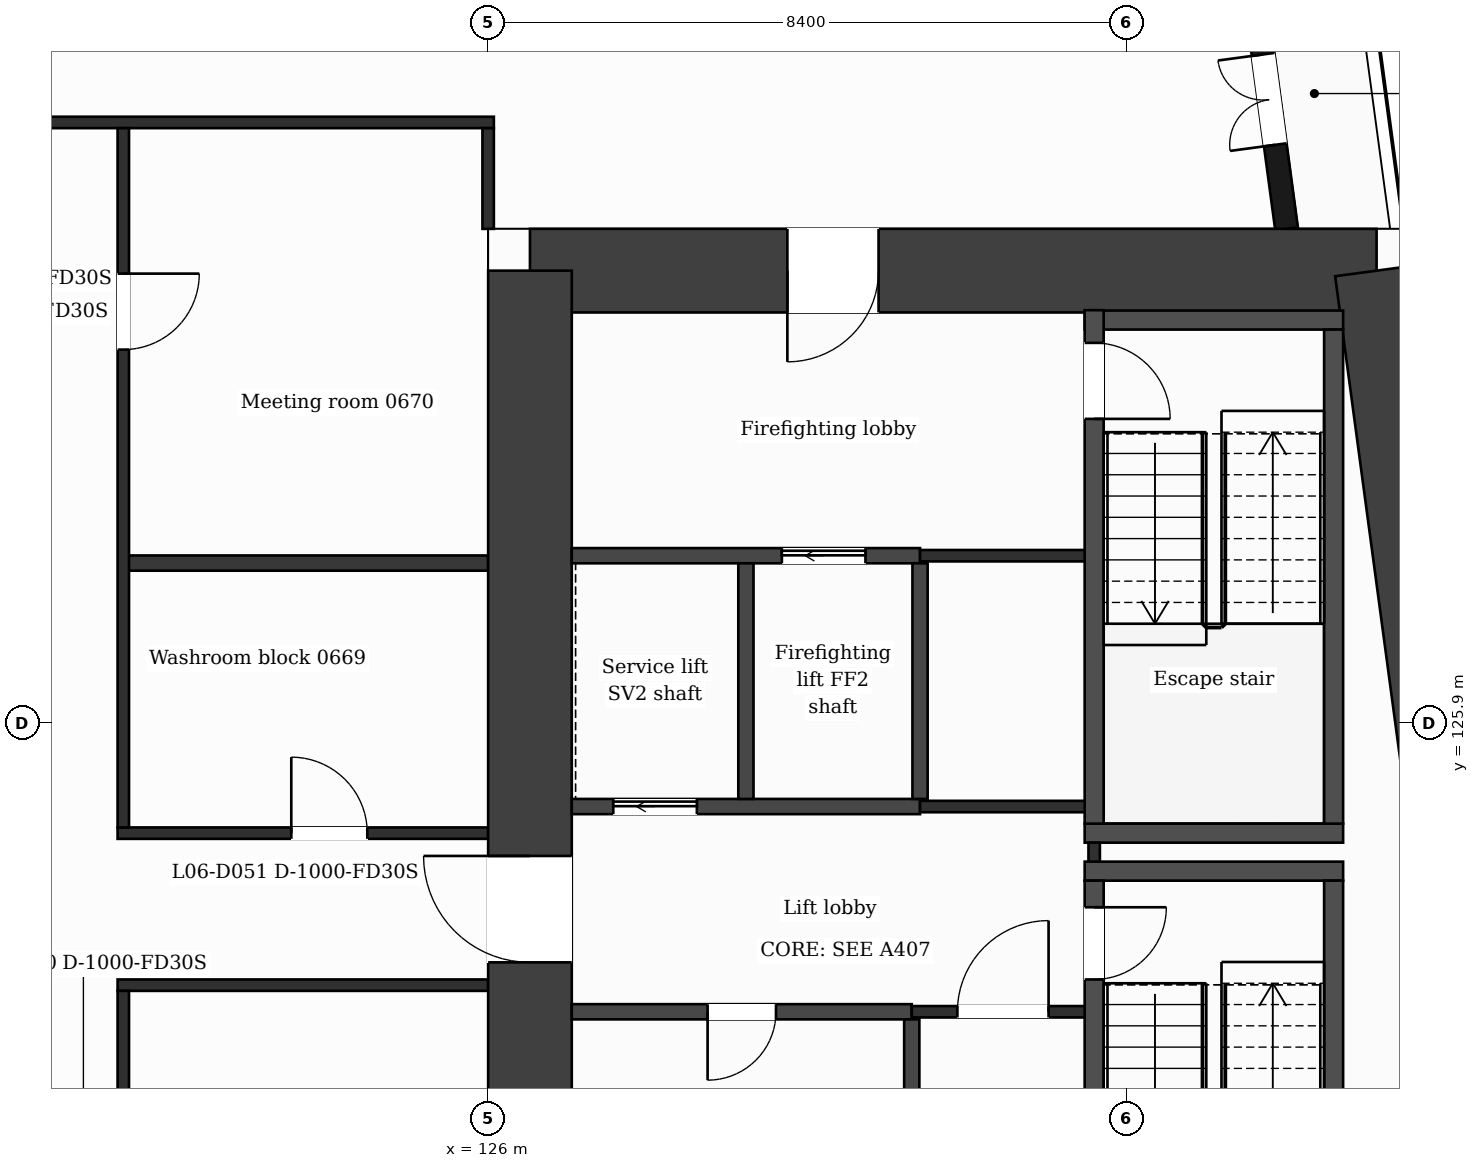
"""IFC4 building model, lengths in metres.
Left out: names, types, materials, properties, quantities, classifications, styles, units other than length and angle.
Written with IfcOpenShell. Run it as: python <this file> out.ifc"""

import sys

from ifc_helpers import new_model, si_unit, direction, frame, frame_2d, origin, place, context, subcontext, project, spatial, rectangle, extrude, element, fill, save


model = new_model("IFC4")
c1 = context("Model", 3, precision=1e-05, world=origin(), true_north=direction((0.0, 1.0)))
c2 = subcontext(c1, "Body", "Model", "MODEL_VIEW")
j1 = project(units=[si_unit("LENGTHUNIT", "METRE"), si_unit("PLANEANGLEUNIT", "RADIAN")], contexts=[c1])
p1 = place(None, origin())
s1 = spatial("IfcSite", under=j1, at=p1, CompositionType="ELEMENT")
p2 = place(p1, origin())
s2 = spatial("IfcBuilding", under=s1, at=p2, CompositionType="ELEMENT")
p3 = place(p2, frame((0.0, 0.0, 39.0)))
s3 = spatial("IfcBuildingStorey", under=s2, at=p3, CompositionType="ELEMENT", Elevation=39.0)
p4 = place(p3, frame((126.55, 131.85, 0.0), z_axis=(0.0, 0.0, 1.0), x_axis=(1.0, 0.0, 0.0)))
e1 = element("IfcWall", 1, at=p4, inside=s3, PredefinedType="SHEAR", context=c2, shape_type="SweptSolid", body=[
    extrude(rectangle(XDim=11.138, YDim=1.1, at=frame_2d((5.569, 0.0))), origin(), (0.0, 0.0, 1.0), 3.5),
])
p5 = place(p4, frame((3.386, 0.0, 0.0)))
e2 = element("IfcOpeningElement", 2, at=p5, cuts=e1, PredefinedType="OPENING", context=c2, shape_type="SweptSolid", body=[
    extrude(rectangle(XDim=1.2, YDim=2.1, at=frame_2d((0.6, 1.05))), frame((0.0, 0.56, 0.0), z_axis=(0.0, -1.0, 0.0), x_axis=(1.0, 0.0, 0.0)), (0.0, 0.0, 1.0), 1.12),
])
p6 = place(p3, frame((137.688, 131.85, 0.0), z_axis=(0.0, 0.0, 1.0), x_axis=(0.133411793472, -0.991060691059, 0.0)))
e3 = element("IfcWall", 3, at=p6, inside=s3, PredefinedType="SHEAR", context=c2, shape_type="SweptSolid", body=[
    extrude(rectangle(XDim=21.089, YDim=1.1, at=frame_2d((10.544, 0.0))), origin(), (0.0, 0.0, 1.0), 3.5),
])
p7 = place(p3, frame((126.55, 110.95, 0.0), z_axis=(0.0, 0.0, 1.0), x_axis=(0.0, 1.0, 0.0)))
e4 = element("IfcWall", 4, at=p7, inside=s3, PredefinedType="SHEAR", context=c2, shape_type="SweptSolid", body=[
    extrude(rectangle(XDim=20.9, YDim=1.1, at=frame_2d((10.45, 0.0))), origin(), (0.0, 0.0, 1.0), 3.5),
])
p8 = place(p7, frame((11.8, 0.0, 0.0)))
e5 = element("IfcOpeningElement", 5, at=p8, cuts=e4, PredefinedType="OPENING", context=c2, shape_type="SweptSolid", body=[
    extrude(rectangle(XDim=1.4, YDim=2.1, at=frame_2d((0.7, 1.05))), frame((0.0, 0.56, 0.0), z_axis=(0.0, -1.0, 0.0), x_axis=(1.0, 0.0, 0.0)), (0.0, 0.0, 1.0), 1.12),
])
p9 = place(p3, frame((136.504, 132.4, 0.0), z_axis=(0.0, 0.0, 1.0), x_axis=(-0.133399697462, 0.99106231929, 0.0)))
e6 = element("IfcWall", 6, at=p9, inside=s3, PredefinedType="SOLIDWALL", context=c2, shape_type="SweptSolid", body=[
    extrude(rectangle(XDim=6.74, YDim=0.3, at=frame_2d((3.37, 0.0))), origin(), (0.0, 0.0, 1.0), 3.18),
])
p10 = place(p9, frame((1.115, 0.0, 0.0)))
e7 = element("IfcOpeningElement", 7, at=p10, cuts=e6, PredefinedType="OPENING", context=c2, shape_type="SweptSolid", body=[
    extrude(rectangle(XDim=1.2, YDim=2.4, at=frame_2d((0.6, 1.2))), frame((0.0, 0.16, 0.0), z_axis=(0.0, -1.0, 0.0), x_axis=(1.0, 0.0, 0.0)), (0.0, 0.0, 1.0), 0.32),
])
p11 = place(p9, frame((3.835, 0.0, 0.9)))
e8 = element("IfcOpeningElement", 8, at=p11, cuts=e6, PredefinedType="OPENING", context=c2, shape_type="SweptSolid", body=[
    extrude(rectangle(XDim=2.4, YDim=2.1, at=frame_2d((1.2, 1.05))), frame((0.0, 0.16, 0.0), z_axis=(0.0, -1.0, 0.0), x_axis=(1.0, 0.0, 0.0)), (0.0, 0.0, 1.0), 0.32),
])
p12 = place(p3, frame((127.1, 122.1, 0.0), z_axis=(0.0, 0.0, 1.0), x_axis=(1.0, 0.0, 0.0)))
e9 = element("IfcWall", 9, at=p12, inside=s3, PredefinedType="PARTITIONING", context=c2, shape_type="SweptSolid", body=[
    extrude(rectangle(XDim=4.473, YDim=0.2, at=frame_2d((2.236, 0.0))), origin(), (0.0, 0.0, 1.0), 3.18),
])
p13 = place(p12, frame((1.787, 0.0, 0.0)))
e10 = element("IfcOpeningElement", 10, at=p13, cuts=e9, PredefinedType="OPENING", context=c2, shape_type="SweptSolid", body=[
    extrude(rectangle(XDim=0.9, YDim=2.1, at=frame_2d((0.45, 1.05))), frame((0.0, 0.11, 0.0), z_axis=(0.0, -1.0, 0.0), x_axis=(1.0, 0.0, 0.0)), (0.0, 0.0, 1.0), 0.22),
])
p14 = place(p3, frame((131.573, 122.1, 0.0), z_axis=(0.0, 0.0, 1.0), x_axis=(1.0, 0.0, 0.0)))
e11 = element("IfcWall", 11, at=p14, inside=s3, PredefinedType="PARTITIONING", context=c2, shape_type="SweptSolid", body=[
    extrude(rectangle(XDim=2.4, YDim=0.15, at=frame_2d((1.2, 0.0))), origin(), (0.0, 0.0, 1.0), 3.18),
])
p15 = place(p14, frame((0.6, 0.0, 0.0)))
e12 = element("IfcOpeningElement", 12, at=p15, cuts=e11, PredefinedType="OPENING", context=c2, shape_type="SweptSolid", body=[
    extrude(rectangle(XDim=1.2, YDim=2.1, at=frame_2d((0.6, 1.05))), frame((0.0, 0.085, 0.0), z_axis=(0.0, -1.0, 0.0), x_axis=(1.0, 0.0, 0.0)), (0.0, 0.0, 1.0), 0.17),
])
p16 = place(p3, frame((121.125, 122.45, 0.0), z_axis=(0.0, 0.0, 1.0), x_axis=(1.0, 0.0, 0.0)))
e13 = element("IfcWall", 13, at=p16, inside=s3, PredefinedType="PARTITIONING", context=c2, shape_type="SweptSolid", body=[
    extrude(rectangle(XDim=4.875, YDim=0.15, at=frame_2d((2.438, 0.0))), origin(), (0.0, 0.0, 1.0), 3.18),
])
for number, where, z_axis, x_axis in (
    (14, (133.848, 123.95, 0.0), (0.0, 0.0, 1.0), (1.0, 0.0, 0.0)),
    (15, (133.848, 124.45, 0.0), (0.0, 0.0, 1.0), (1.0, 0.0, 0.0)),
):
    element("IfcWall", number, at=place(p3, frame(where, z_axis=z_axis, x_axis=x_axis)), inside=s3, PredefinedType="PARTITIONING", context=c2, shape_type="SweptSolid", body=[
        extrude(rectangle(XDim=3.4, YDim=0.25, at=frame_2d((1.7, 0.0))), origin(), (0.0, 0.0, 1.0), 3.18),
    ])
p17 = place(p3, frame((121.125, 124.45, 0.0), z_axis=(0.0, 0.0, 1.0), x_axis=(1.0, 0.0, 0.0)))
e16 = element("IfcWall", 16, at=p17, inside=s3, PredefinedType="PARTITIONING", context=c2, shape_type="SweptSolid", body=[
    extrude(rectangle(XDim=4.875, YDim=0.15, at=frame_2d((2.438, 0.0))), origin(), (0.0, 0.0, 1.0), 3.18),
])
p18 = place(p17, frame((2.285, 0.0, 0.0)))
e17 = element("IfcOpeningElement", 17, at=p18, cuts=e16, PredefinedType="OPENING", context=c2, shape_type="SweptSolid", body=[
    extrude(rectangle(XDim=1.0, YDim=2.1, at=frame_2d((0.5, 1.05))), frame((0.0, 0.085, 0.0), z_axis=(0.0, -1.0, 0.0), x_axis=(1.0, 0.0, 0.0)), (0.0, 0.0, 1.0), 0.17),
])
p19 = place(p3, frame((127.1, 124.8, 0.0), z_axis=(0.0, 0.0, 1.0), x_axis=(1.0, 0.0, 0.0)))
e18 = element("IfcWall", 18, at=p19, inside=s3, PredefinedType="PARTITIONING", context=c2, shape_type="SweptSolid", body=[
    extrude(rectangle(XDim=4.582, YDim=0.2, at=frame_2d((2.291, 0.0))), origin(), (0.0, 0.0, 1.0), 3.18),
])
p20 = place(p19, frame((0.546, 0.0, 0.0)))
e19 = element("IfcOpeningElement", 19, at=p20, cuts=e18, PredefinedType="OPENING", context=c2, shape_type="SweptSolid", body=[
    extrude(rectangle(XDim=1.1, YDim=2.1, at=frame_2d((0.55, 1.05))), frame((0.0, 0.11, 0.0), z_axis=(0.0, -1.0, 0.0), x_axis=(1.0, 0.0, 0.0)), (0.0, 0.0, 1.0), 0.22),
])
p21 = place(p3, frame((131.682, 124.8, 0.0), z_axis=(0.0, 0.0, 1.0), x_axis=(1.0, 0.0, 0.0)))
e20 = element("IfcWall", 20, at=p21, inside=s3, PredefinedType="PARTITIONING", context=c2, shape_type="SweptSolid", body=[
    extrude(rectangle(XDim=2.416, YDim=0.15, at=frame_2d((1.208, 0.0))), origin(), (0.0, 0.0, 1.0), 3.18),
])
p22 = place(p3, frame((121.2, 128.003, 0.0), z_axis=(0.0, 0.0, 1.0), x_axis=(1.0, 0.0, 0.0)))
e21 = element("IfcWall", 21, at=p22, inside=s3, PredefinedType="PARTITIONING", context=c2, shape_type="SweptSolid", body=[
    extrude(rectangle(XDim=4.8, YDim=0.2, at=frame_2d((2.4, 0.0))), origin(), (0.0, 0.0, 1.0), 3.18),
])
p23 = place(p3, frame((127.1, 128.1, 0.0), z_axis=(0.0, 0.0, 1.0), x_axis=(1.0, 0.0, 0.0)))
e22 = element("IfcWall", 22, at=p23, inside=s3, PredefinedType="PARTITIONING", context=c2, shape_type="SweptSolid", body=[
    extrude(rectangle(XDim=4.582, YDim=0.2, at=frame_2d((2.291, 0.0))), origin(), (0.0, 0.0, 1.0), 3.18),
])
p24 = place(p23, frame((2.764, 0.0, 0.0)))
e23 = element("IfcOpeningElement", 23, at=p24, cuts=e22, PredefinedType="OPENING", context=c2, shape_type="SweptSolid", body=[
    extrude(rectangle(XDim=1.1, YDim=2.1, at=frame_2d((0.55, 1.05))), frame((0.0, 0.11, 0.0), z_axis=(0.0, -1.0, 0.0), x_axis=(1.0, 0.0, 0.0)), (0.0, 0.0, 1.0), 0.22),
])
p25 = place(p3, frame((131.682, 128.1, 0.0), z_axis=(0.0, 0.0, 1.0), x_axis=(1.0, 0.0, 0.0)))
e24 = element("IfcWall", 24, at=p25, inside=s3, PredefinedType="PARTITIONING", context=c2, shape_type="SweptSolid", body=[
    extrude(rectangle(XDim=2.291, YDim=0.15, at=frame_2d((1.146, 0.0))), origin(), (0.0, 0.0, 1.0), 3.18),
])
p26 = place(p3, frame((133.848, 131.2, 0.0), z_axis=(0.0, 0.0, 1.0), x_axis=(1.0, 0.0, 0.0)))
e25 = element("IfcWall", 25, at=p26, inside=s3, PredefinedType="PARTITIONING", context=c2, shape_type="SweptSolid", body=[
    extrude(rectangle(XDim=3.4, YDim=0.25, at=frame_2d((1.7, 0.0))), origin(), (0.0, 0.0, 1.0), 3.18),
])
p27 = place(p3, frame((100.725, 133.8, 0.0), z_axis=(0.0, 0.0, 1.0), x_axis=(1.0, 0.0, 0.0)))
e26 = element("IfcWall", 26, at=p27, inside=s3, PredefinedType="PARTITIONING", context=c2, shape_type="SweptSolid", body=[
    extrude(rectangle(XDim=25.35, YDim=0.15, at=frame_2d((12.675, 0.0))), origin(), (0.0, 0.0, 1.0), 3.18),
])
p28 = place(p3, frame((121.2, 109.075, 0.0), z_axis=(0.0, 0.0, 1.0), x_axis=(0.0, 1.0, 0.0)))
e27 = element("IfcWall", 27, at=p28, inside=s3, PredefinedType="PARTITIONING", context=c2, shape_type="SweptSolid", body=[
    extrude(rectangle(XDim=13.3, YDim=0.15, at=frame_2d((6.65, 0.0))), origin(), (0.0, 0.0, 1.0), 3.18),
])
p29 = place(p28, frame((9.154, 0.0, 0.0)))
e28 = element("IfcOpeningElement", 28, at=p29, cuts=e27, PredefinedType="OPENING", context=c2, shape_type="SweptSolid", body=[
    extrude(rectangle(XDim=1.0, YDim=2.1, at=frame_2d((0.5, 1.05))), frame((0.0, 0.085, 0.0), z_axis=(0.0, -1.0, 0.0), x_axis=(1.0, 0.0, 0.0)), (0.0, 0.0, 1.0), 0.17),
])
p30 = place(p3, frame((121.2, 124.525, 0.0), z_axis=(0.0, 0.0, 1.0), x_axis=(0.0, 1.0, 0.0)))
e29 = element("IfcWall", 29, at=p30, inside=s3, PredefinedType="PARTITIONING", context=c2, shape_type="SweptSolid", body=[
    extrude(rectangle(XDim=9.2, YDim=0.15, at=frame_2d((4.6, 0.0))), origin(), (0.0, 0.0, 1.0), 3.18),
])
p31 = place(p30, frame((6.286, 0.0, 0.0)))
e30 = element("IfcOpeningElement", 30, at=p31, cuts=e29, PredefinedType="OPENING", context=c2, shape_type="SweptSolid", body=[
    extrude(rectangle(XDim=1.0, YDim=2.1, at=frame_2d((0.5, 1.05))), frame((0.0, 0.085, 0.0), z_axis=(0.0, -1.0, 0.0), x_axis=(1.0, 0.0, 0.0)), (0.0, 0.0, 1.0), 0.17),
])
p32 = place(p3, frame((126.0, 132.4, 0.0), z_axis=(0.0, 0.0, 1.0), x_axis=(0.0, 1.0, 0.0)))
e31 = element("IfcWall", 31, at=p32, inside=s3, PredefinedType="PARTITIONING", context=c2, shape_type="SweptSolid", body=[
    extrude(rectangle(XDim=1.325, YDim=0.15, at=frame_2d((0.663, 0.0))), origin(), (0.0, 0.0, 1.0), 3.18),
])
p33 = place(p3, frame((129.391, 124.9, 0.0), z_axis=(0.0, 0.0, 1.0), x_axis=(0.0, 1.0, 0.0)))
e32 = element("IfcWall", 32, at=p33, inside=s3, PredefinedType="PARTITIONING", context=c2, shape_type="SweptSolid", body=[
    extrude(rectangle(XDim=3.1, YDim=0.2, at=frame_2d((1.55, 0.0))), origin(), (0.0, 0.0, 1.0), 3.18),
])
p34 = place(p3, frame((131.573, 117.07, 0.0), z_axis=(0.0, 0.0, 1.0), x_axis=(0.0, 1.0, 0.0)))
e33 = element("IfcWall", 33, at=p34, inside=s3, PredefinedType="PARTITIONING", context=c2, shape_type="SweptSolid", body=[
    extrude(rectangle(XDim=4.93, YDim=0.2, at=frame_2d((2.465, 0.0))), origin(), (0.0, 0.0, 1.0), 3.18),
])
p35 = place(p34, frame((0.48, 0.0, 0.0)))
e34 = element("IfcOpeningElement", 34, at=p35, cuts=e33, PredefinedType="OPENING", context=c2, shape_type="SweptSolid", body=[
    extrude(rectangle(XDim=0.9, YDim=2.1, at=frame_2d((0.45, 1.05))), frame((0.0, 0.11, 0.0), z_axis=(0.0, -1.0, 0.0), x_axis=(1.0, 0.0, 0.0)), (0.0, 0.0, 1.0), 0.22),
])
p36 = place(p3, frame((131.682, 124.9, 0.0), z_axis=(0.0, 0.0, 1.0), x_axis=(0.0, 1.0, 0.0)))
e35 = element("IfcWall", 35, at=p36, inside=s3, PredefinedType="PARTITIONING", context=c2, shape_type="SweptSolid", body=[
    extrude(rectangle(XDim=3.1, YDim=0.2, at=frame_2d((1.55, 0.0))), origin(), (0.0, 0.0, 1.0), 3.18),
])
p37 = place(p3, frame((133.973, 124.075, 0.0), z_axis=(0.0, 0.0, 1.0), x_axis=(0.0, 1.0, 0.0)))
e36 = element("IfcWall", 36, at=p37, inside=s3, PredefinedType="PARTITIONING", context=c2, shape_type="SweptSolid", body=[
    extrude(rectangle(XDim=0.25, YDim=0.15, at=frame_2d((0.125, 0.0))), origin(), (0.0, 0.0, 1.0), 3.18),
])
p38 = place(p3, frame((133.973, 117.07, 0.0), z_axis=(0.0, 0.0, 1.0), x_axis=(0.0, 1.0, 0.0)))
e37 = element("IfcWall", 37, at=p38, inside=s3, PredefinedType="PARTITIONING", context=c2, shape_type="SweptSolid", body=[
    extrude(rectangle(XDim=6.755, YDim=0.25, at=frame_2d((3.377, 0.0))), origin(), (0.0, 0.0, 1.0), 3.18),
])
p39 = place(p38, frame((5.455, 0.0, 0.0)))
e38 = element("IfcOpeningElement", 38, at=p39, cuts=e37, PredefinedType="OPENING", context=c2, shape_type="SweptSolid", body=[
    extrude(rectangle(XDim=0.95, YDim=2.1, at=frame_2d((0.475, 1.05))), frame((0.0, 0.135, 0.0), z_axis=(0.0, -1.0, 0.0), x_axis=(1.0, 0.0, 0.0)), (0.0, 0.0, 1.0), 0.27),
])
p40 = place(p3, frame((133.973, 124.575, 0.0), z_axis=(0.0, 0.0, 1.0), x_axis=(0.0, 1.0, 0.0)))
e39 = element("IfcWall", 39, at=p40, inside=s3, PredefinedType="PARTITIONING", context=c2, shape_type="SweptSolid", body=[
    extrude(rectangle(XDim=6.755, YDim=0.25, at=frame_2d((3.377, 0.0))), origin(), (0.0, 0.0, 1.0), 3.18),
])
p41 = place(p40, frame((5.325, 0.0, 0.0)))
e40 = element("IfcOpeningElement", 40, at=p41, cuts=e39, PredefinedType="OPENING", context=c2, shape_type="SweptSolid", body=[
    extrude(rectangle(XDim=1.0, YDim=2.1, at=frame_2d((0.5, 1.05))), frame((0.0, 0.135, 0.0), z_axis=(0.0, -1.0, 0.0), x_axis=(1.0, 0.0, 0.0)), (0.0, 0.0, 1.0), 0.27),
])
p42 = place(p3, frame((137.123, 117.07, 0.0), z_axis=(0.0, 0.0, 1.0), x_axis=(0.0, 1.0, 0.0)))
e41 = element("IfcWall", 41, at=p42, inside=s3, PredefinedType="PARTITIONING", context=c2, shape_type="SweptSolid", body=[
    extrude(rectangle(XDim=6.755, YDim=0.25, at=frame_2d((3.377, 0.0))), origin(), (0.0, 0.0, 1.0), 3.18),
])
p43 = place(p3, frame((137.123, 124.575, 0.0), z_axis=(0.0, 0.0, 1.0), x_axis=(0.0, 1.0, 0.0)))
e42 = element("IfcWall", 42, at=p43, inside=s3, PredefinedType="PARTITIONING", context=c2, shape_type="SweptSolid", body=[
    extrude(rectangle(XDim=6.5, YDim=0.25, at=frame_2d((3.25, 0.0))), origin(), (0.0, 0.0, 1.0), 3.18),
])
p44 = place(p10, origin())
e43 = element("IfcDoor", 43, at=p44, inside=s3, OperationType="DOUBLE_DOOR_SINGLE_SWING", PredefinedType="DOOR", context=c2, shape_type="SweptSolid", body=[
    extrude(rectangle(XDim=1.2, YDim=2.4, at=frame_2d((0.6, 1.2))), frame((0.0, 0.025, 0.0), z_axis=(0.0, -1.0, 0.0), x_axis=(1.0, 0.0, 0.0)), (0.0, 0.0, 1.0), 0.05),
])
fill(e7, e43)
p45 = place(p15, origin())
e44 = element("IfcDoor", 44, at=p45, inside=s3, OperationType="SINGLE_SWING_RIGHT", PredefinedType="DOOR", context=c2, shape_type="SweptSolid", body=[
    extrude(rectangle(XDim=1.2, YDim=2.1, at=frame_2d((0.6, 1.05))), frame((0.0, 0.025, 0.0), z_axis=(0.0, -1.0, 0.0), x_axis=(1.0, 0.0, 0.0)), (0.0, 0.0, 1.0), 0.05),
])
fill(e12, e44)
p46 = place(p24, origin())
e45 = element("IfcDoor", 45, at=p46, inside=s3, OperationType="SLIDING_TO_LEFT", PredefinedType="DOOR", context=c2, shape_type="SweptSolid", body=[
    extrude(rectangle(XDim=1.1, YDim=2.1, at=frame_2d((0.55, 1.05))), frame((0.0, 0.025, 0.0), z_axis=(0.0, -1.0, 0.0), x_axis=(1.0, 0.0, 0.0)), (0.0, 0.0, 1.0), 0.05),
])
fill(e23, e45)
p47 = place(p20, origin())
e46 = element("IfcDoor", 46, at=p47, inside=s3, OperationType="SLIDING_TO_LEFT", PredefinedType="DOOR", context=c2, shape_type="SweptSolid", body=[
    extrude(rectangle(XDim=1.1, YDim=2.1, at=frame_2d((0.55, 1.05))), frame((0.0, 0.025, 0.0), z_axis=(0.0, -1.0, 0.0), x_axis=(1.0, 0.0, 0.0)), (0.0, 0.0, 1.0), 0.05),
])
fill(e19, e46)
p48 = place(p13, origin())
e47 = element("IfcDoor", 47, at=p48, inside=s3, OperationType="SINGLE_SWING_LEFT", PredefinedType="DOOR", context=c2, shape_type="SweptSolid", body=[
    extrude(rectangle(XDim=0.9, YDim=2.1, at=frame_2d((0.45, 1.05))), frame((0.0, 0.025, 0.0), z_axis=(0.0, -1.0, 0.0), x_axis=(1.0, 0.0, 0.0)), (0.0, 0.0, 1.0), 0.05),
])
fill(e10, e47)
p49 = place(p39, origin())
e48 = element("IfcDoor", 48, at=p49, inside=s3, OperationType="SINGLE_SWING_RIGHT", PredefinedType="DOOR", context=c2, shape_type="SweptSolid", body=[
    extrude(rectangle(XDim=0.95, YDim=2.1, at=frame_2d((0.475, 1.05))), frame((0.0, 0.025, 0.0), z_axis=(0.0, -1.0, 0.0), x_axis=(1.0, 0.0, 0.0)), (0.0, 0.0, 1.0), 0.05),
])
fill(e38, e48)
p50 = place(p41, origin())
e49 = element("IfcDoor", 49, at=p50, inside=s3, OperationType="SINGLE_SWING_LEFT", PredefinedType="DOOR", context=c2, shape_type="SweptSolid", body=[
    extrude(rectangle(XDim=1.0, YDim=2.1, at=frame_2d((0.5, 1.05))), frame((0.0, 0.025, 0.0), z_axis=(0.0, -1.0, 0.0), x_axis=(1.0, 0.0, 0.0)), (0.0, 0.0, 1.0), 0.05),
])
fill(e40, e49)
p51 = place(p18, origin())
e50 = element("IfcDoor", 50, at=p51, inside=s3, OperationType="SINGLE_SWING_LEFT", PredefinedType="DOOR", context=c2, shape_type="SweptSolid", body=[
    extrude(rectangle(XDim=1.0, YDim=2.1, at=frame_2d((0.5, 1.05))), frame((0.0, 0.025, 0.0), z_axis=(0.0, -1.0, 0.0), x_axis=(1.0, 0.0, 0.0)), (0.0, 0.0, 1.0), 0.05),
])
fill(e17, e50)
p52 = place(p31, origin())
e51 = element("IfcDoor", 51, at=p52, inside=s3, OperationType="SINGLE_SWING_RIGHT", PredefinedType="DOOR", context=c2, shape_type="SweptSolid", body=[
    extrude(rectangle(XDim=1.0, YDim=2.1, at=frame_2d((0.5, 1.05))), frame((0.0, 0.025, 0.0), z_axis=(0.0, -1.0, 0.0), x_axis=(1.0, 0.0, 0.0)), (0.0, 0.0, 1.0), 0.05),
])
fill(e30, e51)
p53 = place(p5, origin())
e52 = element("IfcDoor", 52, at=p53, inside=s3, OperationType="SINGLE_SWING_LEFT", PredefinedType="DOOR", context=c2, shape_type="SweptSolid", body=[
    extrude(rectangle(XDim=1.2, YDim=2.1, at=frame_2d((0.6, 1.05))), frame((0.0, 0.025, 0.0), z_axis=(0.0, -1.0, 0.0), x_axis=(1.0, 0.0, 0.0)), (0.0, 0.0, 1.0), 0.05),
])
fill(e2, e52)
p54 = place(p8, origin())
e53 = element("IfcDoor", 53, at=p54, inside=s3, OperationType="SINGLE_SWING_RIGHT", PredefinedType="DOOR", context=c2, shape_type="SweptSolid", body=[
    extrude(rectangle(XDim=1.4, YDim=2.1, at=frame_2d((0.7, 1.05))), frame((0.0, 0.025, 0.0), z_axis=(0.0, -1.0, 0.0), x_axis=(1.0, 0.0, 0.0)), (0.0, 0.0, 1.0), 0.05),
])
fill(e5, e53)
save(model, sys.argv[1])
